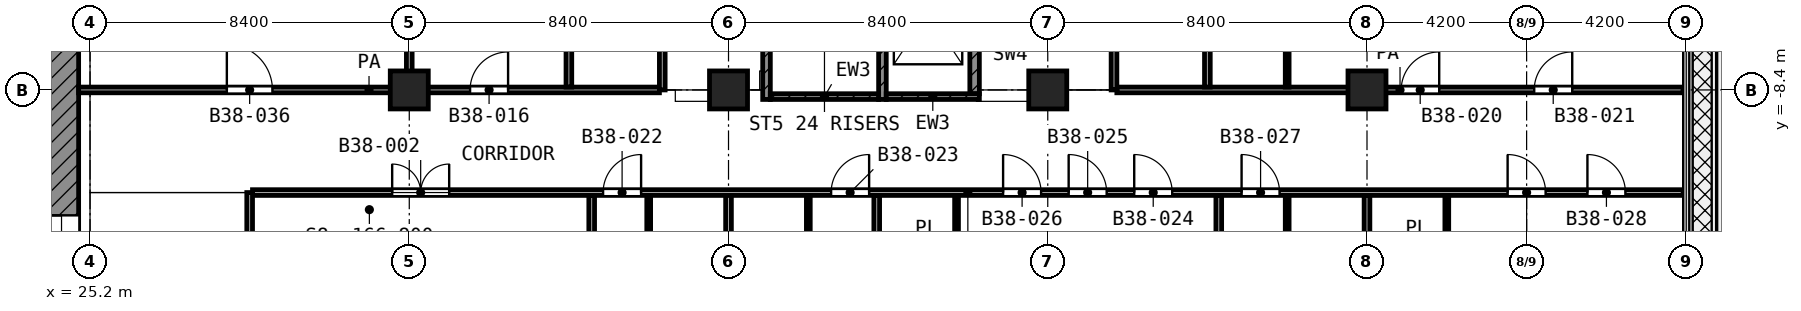
"""IFC4 building model, lengths in metres.
Left out: names, types, materials, properties, quantities, classifications, styles, units other than length and angle.
Written with IfcOpenShell. Run it as: python <this file> out.ifc"""

import sys

from ifc_helpers import new_model, si_unit, direction, frame, frame_2d, origin, origin_2d, place, context, subcontext, project, spatial, rectangle, extrude, element, fill, save


model = new_model("IFC4")
c1 = context("Model", 3, precision=1e-05, world=origin(), true_north=direction((0.0, 1.0)))
c2 = subcontext(c1, "Body", "Model", "MODEL_VIEW")
j1 = project(units=[si_unit("LENGTHUNIT", "METRE"), si_unit("PLANEANGLEUNIT", "RADIAN")], contexts=[c1])
p1 = place(None, origin())
s1 = spatial("IfcSite", under=j1, at=p1, CompositionType="ELEMENT")
p2 = place(p1, origin())
s2 = spatial("IfcBuilding", under=s1, at=p2, CompositionType="ELEMENT")
p3 = place(p2, frame((0.0, 0.0, 166.8)))
s3 = spatial("IfcBuildingStorey", under=s2, at=p3, CompositionType="ELEMENT", Elevation=166.8)
for number, where, z_axis, x_axis in (
    (1, (33.6, -8.4, 0.0), (0.0, 0.0, 1.0), (1.0, 0.0, 0.0)),
    (2, (42.0, -8.4, 0.0), (0.0, 0.0, 1.0), (1.0, 0.0, 0.0)),
    (3, (50.4, -8.4, 0.0), (0.0, 0.0, 1.0), (1.0, 0.0, 0.0)),
    (4, (58.8, -8.4, 0.0), (0.0, 0.0, 1.0), (1.0, 0.0, 0.0)),
):
    element("IfcColumn", number, at=place(p3, frame(where, z_axis=z_axis, x_axis=x_axis)), inside=s3, PredefinedType="COLUMN", context=c2, shape_type="SweptSolid", body=[
        extrude(rectangle(XDim=1.0, YDim=1.0, at=origin_2d()), origin(), (0.0, 0.0, 1.0), 4.2),
    ])
p4 = place(p3, frame((24.45, -24.0, 0.0), z_axis=(0.0, 0.0, 1.0), x_axis=(0.0, 1.0, 0.0)))
e5 = element("IfcWall", 5, at=p4, inside=s3, PredefinedType="SHEAR", context=c2, shape_type="SweptSolid", body=[
    extrude(rectangle(XDim=18.6, YDim=0.9, at=frame_2d((9.3, 0.0))), origin(), (0.0, 0.0, 1.0), 3.6),
])
p5 = place(p4, frame((10.5, 0.0, 0.0)))
e6 = element("IfcOpeningElement", 6, at=p5, cuts=e5, PredefinedType="OPENING", context=c2, shape_type="SweptSolid", body=[
    extrude(rectangle(XDim=1.8, YDim=2.1, at=frame_2d((0.9, 1.05))), frame((0.0, 0.46, 0.0), z_axis=(0.0, -1.0, 0.0), x_axis=(1.0, 0.0, 0.0)), (0.0, 0.0, 1.0), 0.92),
])
p6 = place(p3, frame((43.0, -8.65, 0.0), z_axis=(0.0, 0.0, 1.0), x_axis=(0.0, 1.0, 0.0)))
e7 = element("IfcWall", 7, at=p6, inside=s3, PredefinedType="SHEAR", context=c2, shape_type="SweptSolid", body=[
    extrude(rectangle(XDim=8.35, YDim=0.2, at=frame_2d((4.175, 0.0))), origin(), (0.0, 0.0, 1.0), 3.6),
])
p7 = place(p6, frame((7.0, 0.0, 0.0)))
e8 = element("IfcOpeningElement", 8, at=p7, cuts=e7, PredefinedType="OPENING", context=c2, shape_type="SweptSolid", body=[
    extrude(rectangle(XDim=1.1, YDim=2.1, at=frame_2d((0.55, 1.05))), frame((0.0, 0.11, 0.0), z_axis=(0.0, -1.0, 0.0), x_axis=(1.0, 0.0, 0.0)), (0.0, 0.0, 1.0), 0.22),
])
p8 = place(p3, frame((46.05, -8.65, 0.0), z_axis=(0.0, 0.0, 1.0), x_axis=(0.0, 1.0, 0.0)))
e9 = element("IfcWall", 9, at=p8, inside=s3, PredefinedType="SHEAR", context=c2, shape_type="SweptSolid", body=[
    extrude(rectangle(XDim=8.35, YDim=0.2, at=frame_2d((4.175, 0.0))), origin(), (0.0, 0.0, 1.0), 3.6),
])
p9 = place(p8, frame((7.0, 0.0, 0.0)))
e10 = element("IfcOpeningElement", 10, at=p9, cuts=e9, PredefinedType="OPENING", context=c2, shape_type="SweptSolid", body=[
    extrude(rectangle(XDim=1.1, YDim=2.1, at=frame_2d((0.55, 1.05))), frame((0.0, 0.11, 0.0), z_axis=(0.0, -1.0, 0.0), x_axis=(1.0, 0.0, 0.0)), (0.0, 0.0, 1.0), 0.22),
])
p10 = place(p3, frame((43.1, -8.575, 0.0), z_axis=(0.0, 0.0, 1.0), x_axis=(1.0, 0.0, 0.0)))
e11 = element("IfcWall", 11, at=p10, inside=s3, PredefinedType="SHEAR", context=c2, shape_type="SweptSolid", body=[
    extrude(rectangle(XDim=2.85, YDim=0.15, at=frame_2d((1.425, 0.0))), origin(), (0.0, 0.0, 1.0), 3.6),
])
p11 = place(p3, frame((46.15, -8.575, 0.0), z_axis=(0.0, 0.0, 1.0), x_axis=(1.0, 0.0, 0.0)))
e12 = element("IfcWall", 12, at=p11, inside=s3, PredefinedType="SHEAR", context=c2, shape_type="SweptSolid", body=[
    extrude(rectangle(XDim=2.45, YDim=0.15, at=frame_2d((1.225, 0.0))), origin(), (0.0, 0.0, 1.0), 3.6),
])
p12 = place(p3, frame((48.475, -8.5, 0.0), z_axis=(0.0, 0.0, 1.0), x_axis=(0.0, 1.0, 0.0)))
e13 = element("IfcWall", 13, at=p12, inside=s3, PredefinedType="SHEAR", context=c2, shape_type="SweptSolid", body=[
    extrude(rectangle(XDim=3.475, YDim=0.25, at=frame_2d((1.738, 0.0))), origin(), (0.0, 0.0, 1.0), 3.6),
])
for number, where, z_axis, x_axis in (
    (14, (39.9, -14.4, 0.0), (0.0, 0.0, 1.0), (0.0, 1.0, 0.0)),
    (15, (44.1, -14.4, 0.0), (0.0, 0.0, 1.0), (0.0, 1.0, 0.0)),
    (16, (48.0, -14.4, 0.0), (0.0, 0.0, 1.0), (0.0, 1.0, 0.0)),
    (17, (56.7, -14.4, 0.0), (0.0, 0.0, 1.0), (0.0, 1.0, 0.0)),
):
    element("IfcWall", number, at=place(p3, frame(where, z_axis=z_axis, x_axis=x_axis)), inside=s3, PredefinedType="PARTITIONING", context=c2, shape_type="SweptSolid", body=[
        extrude(rectangle(XDim=3.225, YDim=0.1, at=frame_2d((1.612, 0.0))), origin(), (0.0, 0.0, 1.0), 3.6),
    ])
for number, where, z_axis, x_axis in (
    (18, (56.7, -8.325, 0.0), (0.0, 0.0, 1.0), (0.0, 1.0, 0.0)),
    (19, (60.9, -14.399, 0.0), (0.0, 0.0, 1.0), (0.0, 1.0, 0.0)),
):
    element("IfcWall", number, at=place(p3, frame(where, z_axis=z_axis, x_axis=x_axis)), inside=s3, PredefinedType="PARTITIONING", context=c2, shape_type="SweptSolid", body=[
        extrude(rectangle(XDim=3.224, YDim=0.1, at=frame_2d((1.612, 0.0))), origin(), (0.0, 0.0, 1.0), 3.6),
    ])
p13 = place(p3, frame((29.475, -11.1, 0.0), z_axis=(0.0, 0.0, 1.0), x_axis=(1.0, 0.0, 0.0)))
e20 = element("IfcWall", 20, at=p13, inside=s3, PredefinedType="PARTITIONING", context=c2, shape_type="SweptSolid", body=[
    extrude(rectangle(XDim=37.645, YDim=0.15, at=frame_2d((18.823, 0.0))), origin(), (0.0, 0.0, 1.0), 3.6),
])
p14 = place(p13, frame((3.675, 0.0, 0.0)))
e21 = element("IfcOpeningElement", 21, at=p14, cuts=e20, PredefinedType="OPENING", context=c2, shape_type="SweptSolid", body=[
    extrude(rectangle(XDim=1.5, YDim=2.1, at=frame_2d((0.75, 1.05))), frame((0.0, 0.085, 0.0), z_axis=(0.0, -1.0, 0.0), x_axis=(1.0, 0.0, 0.0)), (0.0, 0.0, 1.0), 0.17),
])
p15 = place(p13, frame((9.225, 0.0, 0.0)))
e22 = element("IfcOpeningElement", 22, at=p15, cuts=e20, PredefinedType="OPENING", context=c2, shape_type="SweptSolid", body=[
    extrude(rectangle(XDim=1.0, YDim=2.1, at=frame_2d((0.5, 1.05))), frame((0.0, 0.085, 0.0), z_axis=(0.0, -1.0, 0.0), x_axis=(1.0, 0.0, 0.0)), (0.0, 0.0, 1.0), 0.17),
])
p16 = place(p13, frame((15.225, 0.0, 0.0)))
e23 = element("IfcOpeningElement", 23, at=p16, cuts=e20, PredefinedType="OPENING", context=c2, shape_type="SweptSolid", body=[
    extrude(rectangle(XDim=1.0, YDim=2.1, at=frame_2d((0.5, 1.05))), frame((0.0, 0.085, 0.0), z_axis=(0.0, -1.0, 0.0), x_axis=(1.0, 0.0, 0.0)), (0.0, 0.0, 1.0), 0.17),
])
p17 = place(p13, frame((23.2, 0.0, 0.0)))
e24 = element("IfcOpeningElement", 24, at=p17, cuts=e20, PredefinedType="OPENING", context=c2, shape_type="SweptSolid", body=[
    extrude(rectangle(XDim=1.0, YDim=2.1, at=frame_2d((0.5, 1.05))), frame((0.0, 0.085, 0.0), z_axis=(0.0, -1.0, 0.0), x_axis=(1.0, 0.0, 0.0)), (0.0, 0.0, 1.0), 0.17),
])
p18 = place(p13, frame((21.475, 0.0, 0.0)))
e25 = element("IfcOpeningElement", 25, at=p18, cuts=e20, PredefinedType="OPENING", context=c2, shape_type="SweptSolid", body=[
    extrude(rectangle(XDim=1.0, YDim=2.1, at=frame_2d((0.5, 1.05))), frame((0.0, 0.085, 0.0), z_axis=(0.0, -1.0, 0.0), x_axis=(1.0, 0.0, 0.0)), (0.0, 0.0, 1.0), 0.17),
])
p19 = place(p13, frame((19.75, 0.0, 0.0)))
e26 = element("IfcOpeningElement", 26, at=p19, cuts=e20, PredefinedType="OPENING", context=c2, shape_type="SweptSolid", body=[
    extrude(rectangle(XDim=1.0, YDim=2.1, at=frame_2d((0.5, 1.05))), frame((0.0, 0.085, 0.0), z_axis=(0.0, -1.0, 0.0), x_axis=(1.0, 0.0, 0.0)), (0.0, 0.0, 1.0), 0.17),
])
p20 = place(p13, frame((26.025, 0.0, 0.0)))
e27 = element("IfcOpeningElement", 27, at=p20, cuts=e20, PredefinedType="OPENING", context=c2, shape_type="SweptSolid", body=[
    extrude(rectangle(XDim=1.0, YDim=2.1, at=frame_2d((0.5, 1.05))), frame((0.0, 0.085, 0.0), z_axis=(0.0, -1.0, 0.0), x_axis=(1.0, 0.0, 0.0)), (0.0, 0.0, 1.0), 0.17),
])
p21 = place(p13, frame((35.125, 0.0, 0.0)))
e28 = element("IfcOpeningElement", 28, at=p21, cuts=e20, PredefinedType="OPENING", context=c2, shape_type="SweptSolid", body=[
    extrude(rectangle(XDim=1.0, YDim=2.1, at=frame_2d((0.5, 1.05))), frame((0.0, 0.085, 0.0), z_axis=(0.0, -1.0, 0.0), x_axis=(1.0, 0.0, 0.0)), (0.0, 0.0, 1.0), 0.17),
])
p22 = place(p13, frame((33.025, 0.0, 0.0)))
e29 = element("IfcOpeningElement", 29, at=p22, cuts=e20, PredefinedType="OPENING", context=c2, shape_type="SweptSolid", body=[
    extrude(rectangle(XDim=1.0, YDim=2.1, at=frame_2d((0.5, 1.05))), frame((0.0, 0.085, 0.0), z_axis=(0.0, -1.0, 0.0), x_axis=(1.0, 0.0, 0.0)), (0.0, 0.0, 1.0), 0.17),
])
p23 = place(p3, frame((24.9, -8.4, 0.0), z_axis=(0.0, 0.0, 1.0), x_axis=(1.0, 0.0, 0.0)))
e30 = element("IfcWall", 30, at=p23, inside=s3, PredefinedType="PARTITIONING", context=c2, shape_type="SweptSolid", body=[
    extrude(rectangle(XDim=15.282, YDim=0.15, at=frame_2d((7.641, 0.0))), origin(), (0.0, 0.0, 1.0), 3.6),
])
p24 = place(p23, frame((3.9, 0.0, 0.0)))
e31 = element("IfcOpeningElement", 31, at=p24, cuts=e30, PredefinedType="OPENING", context=c2, shape_type="SweptSolid", body=[
    extrude(rectangle(XDim=1.2, YDim=2.1, at=frame_2d((0.6, 1.05))), frame((0.0, 0.085, 0.0), z_axis=(0.0, -1.0, 0.0), x_axis=(1.0, 0.0, 0.0)), (0.0, 0.0, 1.0), 0.17),
])
p25 = place(p23, frame((10.3, 0.0, 0.0)))
e32 = element("IfcOpeningElement", 32, at=p25, cuts=e30, PredefinedType="OPENING", context=c2, shape_type="SweptSolid", body=[
    extrude(rectangle(XDim=1.0, YDim=2.1, at=frame_2d((0.5, 1.05))), frame((0.0, 0.085, 0.0), z_axis=(0.0, -1.0, 0.0), x_axis=(1.0, 0.0, 0.0)), (0.0, 0.0, 1.0), 0.17),
])
p26 = place(p3, frame((52.218, -8.4, 0.0), z_axis=(0.0, 0.0, 1.0), x_axis=(1.0, 0.0, 0.0)))
e33 = element("IfcWall", 33, at=p26, inside=s3, PredefinedType="PARTITIONING", context=c2, shape_type="SweptSolid", body=[
    extrude(rectangle(XDim=14.902, YDim=0.15, at=frame_2d((7.451, 0.0))), origin(), (0.0, 0.0, 1.0), 3.6),
])
p27 = place(p26, frame((7.482, 0.0, 0.0)))
e34 = element("IfcOpeningElement", 34, at=p27, cuts=e33, PredefinedType="OPENING", context=c2, shape_type="SweptSolid", body=[
    extrude(rectangle(XDim=1.0, YDim=2.1, at=frame_2d((0.5, 1.05))), frame((0.0, 0.085, 0.0), z_axis=(0.0, -1.0, 0.0), x_axis=(1.0, 0.0, 0.0)), (0.0, 0.0, 1.0), 0.17),
])
p28 = place(p26, frame((10.982, 0.0, 0.0)))
e35 = element("IfcOpeningElement", 35, at=p28, cuts=e33, PredefinedType="OPENING", context=c2, shape_type="SweptSolid", body=[
    extrude(rectangle(XDim=1.0, YDim=2.1, at=frame_2d((0.5, 1.05))), frame((0.0, 0.085, 0.0), z_axis=(0.0, -1.0, 0.0), x_axis=(1.0, 0.0, 0.0)), (0.0, 0.0, 1.0), 0.17),
])
p29 = place(p3, frame((29.4, -31.198, 0.0), z_axis=(0.0, 0.0, 1.0), x_axis=(0.0, 1.0, 0.0)))
e36 = element("IfcWall", 36, at=p29, inside=s3, PredefinedType="PARTITIONING", context=c2, shape_type="SweptSolid", body=[
    extrude(rectangle(XDim=20.098, YDim=0.15, at=frame_2d((10.049, 0.0))), origin(), (0.0, 0.0, 1.0), 3.6),
])
p30 = place(p3, frame((33.6, -8.325, 0.0), z_axis=(0.0, 0.0, 1.0), x_axis=(0.0, 1.0, 0.0)))
e37 = element("IfcWall", 37, at=p30, inside=s3, PredefinedType="PARTITIONING", context=c2, shape_type="SweptSolid", body=[
    extrude(rectangle(XDim=8.245, YDim=0.15, at=frame_2d((4.123, 0.0))), origin(), (0.0, 0.0, 1.0), 3.6),
])
p31 = place(p3, frame((37.8, -8.325, 0.0), z_axis=(0.0, 0.0, 1.0), x_axis=(0.0, 1.0, 0.0)))
e38 = element("IfcWall", 38, at=p31, inside=s3, PredefinedType="PARTITIONING", context=c2, shape_type="SweptSolid", body=[
    extrude(rectangle(XDim=8.245, YDim=0.15, at=frame_2d((4.123, 0.0))), origin(), (0.0, 0.0, 1.0), 2.7),
])
p32 = place(p3, frame((38.4, -31.12, 0.0), z_axis=(0.0, 0.0, 1.0), x_axis=(0.0, 1.0, 0.0)))
e39 = element("IfcWall", 39, at=p32, inside=s3, PredefinedType="PARTITIONING", context=c2, shape_type="SweptSolid", body=[
    extrude(rectangle(XDim=19.945, YDim=0.15, at=frame_2d((9.973, 0.0))), origin(), (0.0, 0.0, 1.0), 3.6),
])
p33 = place(p3, frame((40.257, -8.4, 0.0), z_axis=(0.0, 0.0, 1.0), x_axis=(0.0, 1.0, 0.0)))
e40 = element("IfcWall", 40, at=p33, inside=s3, PredefinedType="PARTITIONING", context=c2, shape_type="SweptSolid", body=[
    extrude(rectangle(XDim=8.048, YDim=0.15, at=frame_2d((4.024, 0.0))), origin(), (0.0, 0.0, 1.0), 3.6),
])
p34 = place(p33, frame((3.524, 0.0, 0.0)))
e41 = element("IfcOpeningElement", 41, at=p34, cuts=e40, PredefinedType="OPENING", context=c2, shape_type="SweptSolid", body=[
    extrude(rectangle(XDim=1.0, YDim=2.1, at=frame_2d((0.5, 1.05))), frame((0.0, 0.085, 0.0), z_axis=(0.0, -1.0, 0.0), x_axis=(1.0, 0.0, 0.0)), (0.0, 0.0, 1.0), 0.17),
])
for number, where, z_axis, x_axis in (
    (42, (42.0, -16.72, 0.0), (0.0, 0.0, 1.0), (0.0, 1.0, 0.0)),
    (43, (45.9, -16.72, 0.0), (0.0, 0.0, 1.0), (0.0, 1.0, 0.0)),
):
    element("IfcWall", number, at=place(p3, frame(where, z_axis=z_axis, x_axis=x_axis)), inside=s3, PredefinedType="PARTITIONING", context=c2, shape_type="SweptSolid", body=[
        extrude(rectangle(XDim=5.545, YDim=0.15, at=frame_2d((2.772, 0.0))), origin(), (0.0, 0.0, 1.0), 3.6),
    ])
p35 = place(p3, frame((52.143, -8.4, 0.0), z_axis=(0.0, 0.0, 1.0), x_axis=(0.0, 1.0, 0.0)))
e44 = element("IfcWall", 44, at=p35, inside=s3, PredefinedType="PARTITIONING", context=c2, shape_type="SweptSolid", body=[
    extrude(rectangle(XDim=6.549, YDim=0.15, at=frame_2d((3.274, 0.0))), origin(), (0.0, 0.0, 1.0), 3.6),
])
p36 = place(p35, frame((2.774, 0.0, 0.0)))
e45 = element("IfcOpeningElement", 45, at=p36, cuts=e44, PredefinedType="OPENING", context=c2, shape_type="SweptSolid", body=[
    extrude(rectangle(XDim=1.0, YDim=2.1, at=frame_2d((0.5, 1.05))), frame((0.0, 0.085, 0.0), z_axis=(0.0, -1.0, 0.0), x_axis=(1.0, 0.0, 0.0)), (0.0, 0.0, 1.0), 0.17),
])
p37 = place(p3, frame((54.6, -8.325, 0.0), z_axis=(0.0, 0.0, 1.0), x_axis=(0.0, 1.0, 0.0)))
e46 = element("IfcWall", 46, at=p37, inside=s3, PredefinedType="PARTITIONING", context=c2, shape_type="SweptSolid", body=[
    extrude(rectangle(XDim=8.245, YDim=0.15, at=frame_2d((4.123, 0.0))), origin(), (0.0, 0.0, 1.0), 2.7),
])
for number, where, z_axis, x_axis in (
    (47, (54.9, -16.72, 0.0), (0.0, 0.0, 1.0), (0.0, 1.0, 0.0)),
    (48, (58.8, -16.72, 0.0), (0.0, 0.0, 1.0), (0.0, 1.0, 0.0)),
):
    element("IfcWall", number, at=place(p3, frame(where, z_axis=z_axis, x_axis=x_axis)), inside=s3, PredefinedType="PARTITIONING", context=c2, shape_type="SweptSolid", body=[
        extrude(rectangle(XDim=5.545, YDim=0.15, at=frame_2d((2.772, 0.0))), origin(), (0.0, 0.0, 1.0), 3.6),
    ])
p38 = place(p5, origin())
e49 = element("IfcDoor", 49, at=p38, inside=s3, OperationType="DOUBLE_DOOR_SINGLE_SWING", PredefinedType="DOOR", context=c2, shape_type="SweptSolid", body=[
    extrude(rectangle(XDim=1.8, YDim=2.1, at=frame_2d((0.9, 1.05))), frame((0.0, 0.025, 0.0), z_axis=(0.0, -1.0, 0.0), x_axis=(1.0, 0.0, 0.0)), (0.0, 0.0, 1.0), 0.05),
])
fill(e6, e49)
p39 = place(p24, origin())
e50 = element("IfcDoor", 50, at=p39, inside=s3, OperationType="SINGLE_SWING_LEFT", PredefinedType="DOOR", context=c2, shape_type="SweptSolid", body=[
    extrude(rectangle(XDim=1.2, YDim=2.1, at=frame_2d((0.6, 1.05))), frame((0.0, 0.025, 0.0), z_axis=(0.0, -1.0, 0.0), x_axis=(1.0, 0.0, 0.0)), (0.0, 0.0, 1.0), 0.05),
])
fill(e31, e50)
p40 = place(p25, origin())
e51 = element("IfcDoor", 51, at=p40, inside=s3, OperationType="SINGLE_SWING_RIGHT", PredefinedType="DOOR", context=c2, shape_type="SweptSolid", body=[
    extrude(rectangle(XDim=1.0, YDim=2.1, at=frame_2d((0.5, 1.05))), frame((0.0, 0.025, 0.0), z_axis=(0.0, -1.0, 0.0), x_axis=(1.0, 0.0, 0.0)), (0.0, 0.0, 1.0), 0.05),
])
fill(e32, e51)
p41 = place(p27, origin())
e52 = element("IfcDoor", 52, at=p41, inside=s3, OperationType="SINGLE_SWING_RIGHT", PredefinedType="DOOR", context=c2, shape_type="SweptSolid", body=[
    extrude(rectangle(XDim=1.0, YDim=2.1, at=frame_2d((0.5, 1.05))), frame((0.0, 0.025, 0.0), z_axis=(0.0, -1.0, 0.0), x_axis=(1.0, 0.0, 0.0)), (0.0, 0.0, 1.0), 0.05),
])
fill(e34, e52)
p42 = place(p28, origin())
e53 = element("IfcDoor", 53, at=p42, inside=s3, OperationType="SINGLE_SWING_RIGHT", PredefinedType="DOOR", context=c2, shape_type="SweptSolid", body=[
    extrude(rectangle(XDim=1.0, YDim=2.1, at=frame_2d((0.5, 1.05))), frame((0.0, 0.025, 0.0), z_axis=(0.0, -1.0, 0.0), x_axis=(1.0, 0.0, 0.0)), (0.0, 0.0, 1.0), 0.05),
])
fill(e35, e53)
p43 = place(p14, origin())
e54 = element("IfcDoor", 54, at=p43, inside=s3, OperationType="DOUBLE_DOOR_SINGLE_SWING", PredefinedType="DOOR", context=c2, shape_type="SweptSolid", body=[
    extrude(rectangle(XDim=1.5, YDim=2.1, at=frame_2d((0.75, 1.05))), frame((0.0, 0.025, 0.0), z_axis=(0.0, -1.0, 0.0), x_axis=(1.0, 0.0, 0.0)), (0.0, 0.0, 1.0), 0.05),
])
fill(e21, e54)
p44 = place(p15, origin())
e55 = element("IfcDoor", 55, at=p44, inside=s3, OperationType="SINGLE_SWING_RIGHT", PredefinedType="DOOR", context=c2, shape_type="SweptSolid", body=[
    extrude(rectangle(XDim=1.0, YDim=2.1, at=frame_2d((0.5, 1.05))), frame((0.0, 0.025, 0.0), z_axis=(0.0, -1.0, 0.0), x_axis=(1.0, 0.0, 0.0)), (0.0, 0.0, 1.0), 0.05),
])
fill(e22, e55)
p45 = place(p16, origin())
e56 = element("IfcDoor", 56, at=p45, inside=s3, OperationType="SINGLE_SWING_RIGHT", PredefinedType="DOOR", context=c2, shape_type="SweptSolid", body=[
    extrude(rectangle(XDim=1.0, YDim=2.1, at=frame_2d((0.5, 1.05))), frame((0.0, 0.025, 0.0), z_axis=(0.0, -1.0, 0.0), x_axis=(1.0, 0.0, 0.0)), (0.0, 0.0, 1.0), 0.05),
])
fill(e23, e56)
p46 = place(p17, origin())
e57 = element("IfcDoor", 57, at=p46, inside=s3, OperationType="SINGLE_SWING_LEFT", PredefinedType="DOOR", context=c2, shape_type="SweptSolid", body=[
    extrude(rectangle(XDim=1.0, YDim=2.1, at=frame_2d((0.5, 1.05))), frame((0.0, 0.025, 0.0), z_axis=(0.0, -1.0, 0.0), x_axis=(1.0, 0.0, 0.0)), (0.0, 0.0, 1.0), 0.05),
])
fill(e24, e57)
p47 = place(p18, origin())
e58 = element("IfcDoor", 58, at=p47, inside=s3, OperationType="SINGLE_SWING_LEFT", PredefinedType="DOOR", context=c2, shape_type="SweptSolid", body=[
    extrude(rectangle(XDim=1.0, YDim=2.1, at=frame_2d((0.5, 1.05))), frame((0.0, 0.025, 0.0), z_axis=(0.0, -1.0, 0.0), x_axis=(1.0, 0.0, 0.0)), (0.0, 0.0, 1.0), 0.05),
])
fill(e25, e58)
p48 = place(p19, origin())
e59 = element("IfcDoor", 59, at=p48, inside=s3, OperationType="SINGLE_SWING_LEFT", PredefinedType="DOOR", context=c2, shape_type="SweptSolid", body=[
    extrude(rectangle(XDim=1.0, YDim=2.1, at=frame_2d((0.5, 1.05))), frame((0.0, 0.025, 0.0), z_axis=(0.0, -1.0, 0.0), x_axis=(1.0, 0.0, 0.0)), (0.0, 0.0, 1.0), 0.05),
])
fill(e26, e59)
p49 = place(p20, origin())
e60 = element("IfcDoor", 60, at=p49, inside=s3, OperationType="SINGLE_SWING_LEFT", PredefinedType="DOOR", context=c2, shape_type="SweptSolid", body=[
    extrude(rectangle(XDim=1.0, YDim=2.1, at=frame_2d((0.5, 1.05))), frame((0.0, 0.025, 0.0), z_axis=(0.0, -1.0, 0.0), x_axis=(1.0, 0.0, 0.0)), (0.0, 0.0, 1.0), 0.05),
])
fill(e27, e60)
p50 = place(p21, origin())
e61 = element("IfcDoor", 61, at=p50, inside=s3, OperationType="SINGLE_SWING_LEFT", PredefinedType="DOOR", context=c2, shape_type="SweptSolid", body=[
    extrude(rectangle(XDim=1.0, YDim=2.1, at=frame_2d((0.5, 1.05))), frame((0.0, 0.025, 0.0), z_axis=(0.0, -1.0, 0.0), x_axis=(1.0, 0.0, 0.0)), (0.0, 0.0, 1.0), 0.05),
])
fill(e28, e61)
p51 = place(p22, origin())
e62 = element("IfcDoor", 62, at=p51, inside=s3, OperationType="SINGLE_SWING_LEFT", PredefinedType="DOOR", context=c2, shape_type="SweptSolid", body=[
    extrude(rectangle(XDim=1.0, YDim=2.1, at=frame_2d((0.5, 1.05))), frame((0.0, 0.025, 0.0), z_axis=(0.0, -1.0, 0.0), x_axis=(1.0, 0.0, 0.0)), (0.0, 0.0, 1.0), 0.05),
])
fill(e29, e62)
save(model, sys.argv[1])
